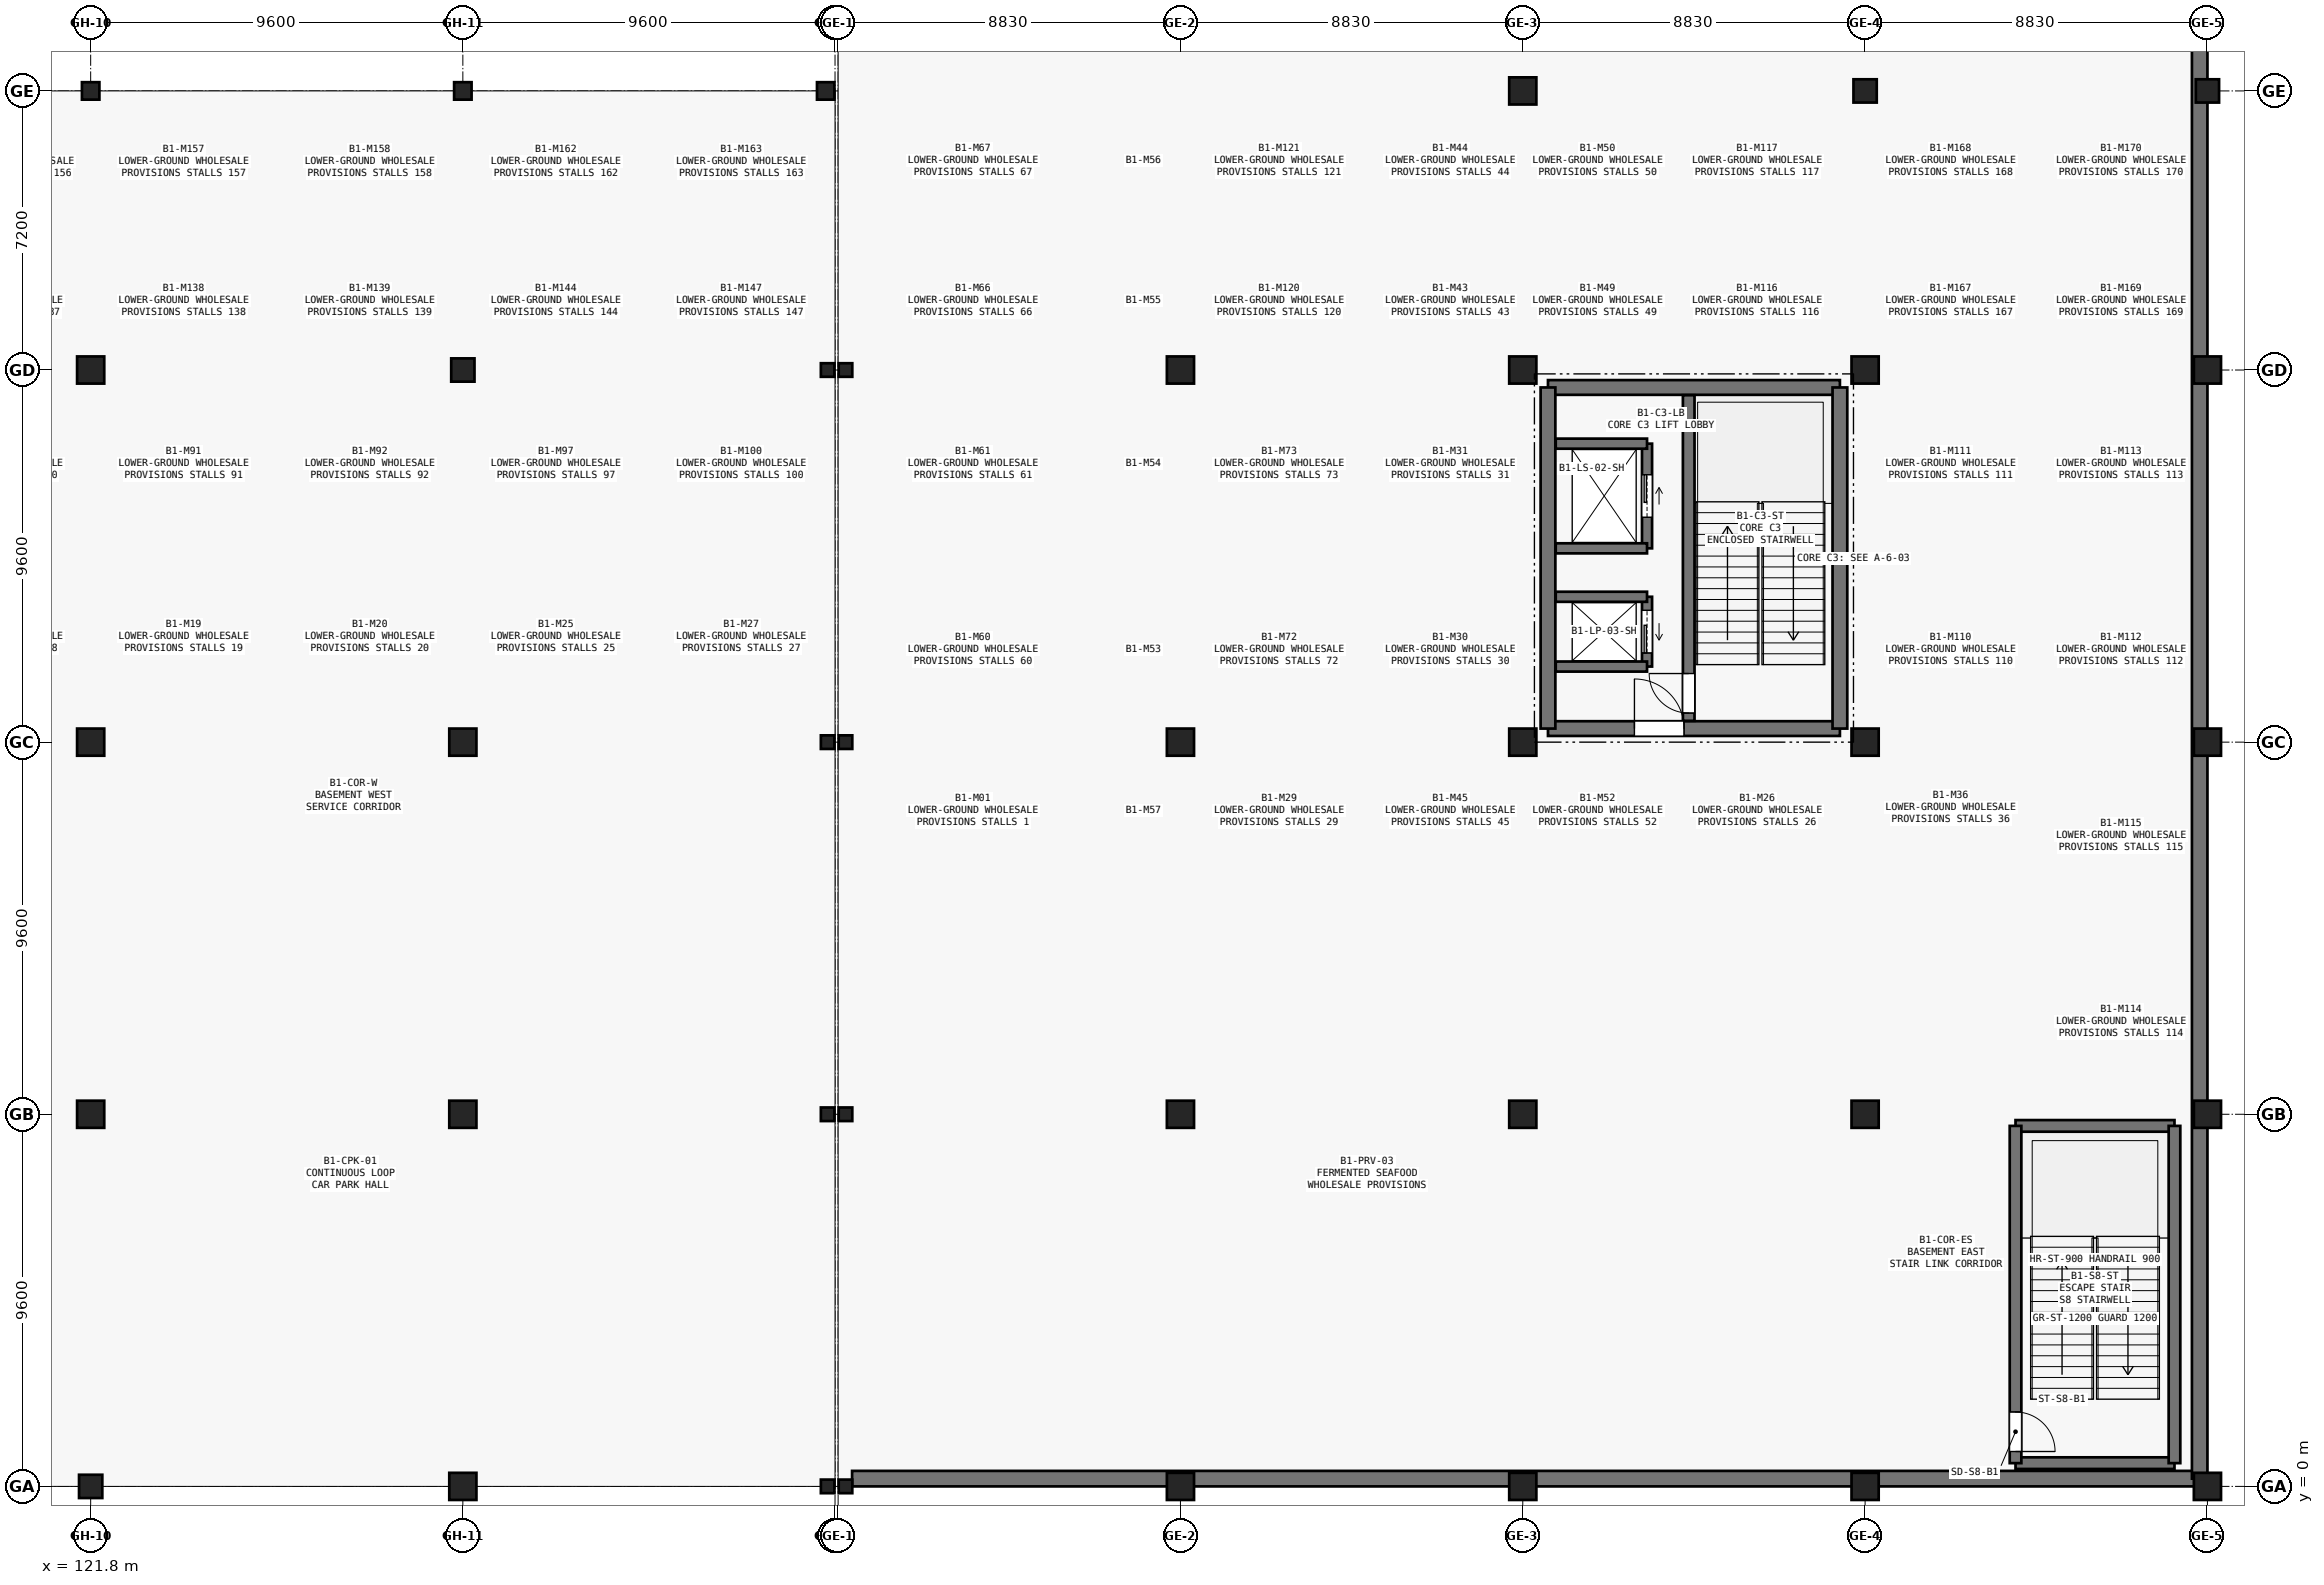
"""IFC4 building model, lengths in metres.
Left out: names, types, materials, properties, quantities, classifications, styles, units other than length and angle.
Written with IfcOpenShell. Run it as: python <this file> out.ifc"""

import sys

from ifc_helpers import new_model, si_unit, direction, frame, frame_2d, origin, origin_2d, place, context, subcontext, project, spatial, rectangle, circle, i_section, extrude, element, fill, save


model = new_model("IFC4")
c1 = context("Model", 3, precision=1e-05, world=origin(), true_north=direction((0.0, 1.0)))
c2 = subcontext(c1, "Body", "Model", "MODEL_VIEW")
j1 = project(units=[si_unit("LENGTHUNIT", "METRE"), si_unit("PLANEANGLEUNIT", "RADIAN")], contexts=[c1])
p1 = place(None, origin())
s1 = spatial("IfcSite", under=j1, at=p1, CompositionType="ELEMENT")
p2 = place(p1, origin())
s2 = spatial("IfcBuilding", under=s1, at=p2, CompositionType="ELEMENT")
p3 = place(p2, frame((0.0, 0.0, -5.4)))
s3 = spatial("IfcBuildingStorey", under=s2, at=p3, CompositionType="ELEMENT", Elevation=-5.4)
p4 = place(p3, frame((121.8, 0.0, 0.0), z_axis=(0.0, 0.0, 1.0), x_axis=(1.0, 0.0, 0.0)))
e1 = element("IfcColumn", 1, at=p4, inside=s3, PredefinedType="COLUMN", context=c2, shape_type="SweptSolid", body=[
    extrude(rectangle(XDim=0.6, YDim=0.6, at=origin_2d()), origin(), (0.0, 0.0, 1.0), 5.4),
])
for number, where, z_axis, x_axis in (
    (2, (121.8, 9.6, 0.0), (0.0, 0.0, 1.0), (1.0, 0.0, 0.0)),
    (3, (121.8, 19.2, 0.0), (0.0, 0.0, 1.0), (1.0, 0.0, 0.0)),
    (4, (121.8, 28.8, 0.0), (0.0, 0.0, 1.0), (1.0, 0.0, 0.0)),
):
    element("IfcColumn", number, at=place(p3, frame(where, z_axis=z_axis, x_axis=x_axis)), inside=s3, PredefinedType="COLUMN", context=c2, shape_type="SweptSolid", body=[
        extrude(circle(Radius=0.35, at=origin_2d()), origin(), (0.0, 0.0, 1.0), 5.4),
    ])
p5 = place(p3, frame((121.8, 36.0, 0.0), z_axis=(0.0, 0.0, 1.0), x_axis=(1.0, 0.0, 0.0)))
e5 = element("IfcColumn", 5, at=p5, inside=s3, PredefinedType="COLUMN", context=c2, shape_type="SweptSolid", body=[
    extrude(i_section(OverallWidth=0.45, OverallDepth=0.45, WebThickness=0.014, FlangeThickness=0.024, FilletRadius=0.024, at=origin_2d()), origin(), (0.0, 0.0, 1.0), 5.4),
])
for number, where, z_axis, x_axis in (
    (6, (131.4, 0.0, 0.0), (0.0, 0.0, 1.0), (1.0, 0.0, 0.0)),
    (7, (131.4, 9.6, 0.0), (0.0, 0.0, 1.0), (1.0, 0.0, 0.0)),
    (8, (131.4, 19.2, 0.0), (0.0, 0.0, 1.0), (1.0, 0.0, 0.0)),
):
    element("IfcColumn", number, at=place(p3, frame(where, z_axis=z_axis, x_axis=x_axis)), inside=s3, PredefinedType="COLUMN", context=c2, shape_type="SweptSolid", body=[
        extrude(circle(Radius=0.35, at=origin_2d()), origin(), (0.0, 0.0, 1.0), 5.4),
    ])
p6 = place(p3, frame((131.4, 28.8, 0.0), z_axis=(0.0, 0.0, 1.0), x_axis=(1.0, 0.0, 0.0)))
e9 = element("IfcColumn", 9, at=p6, inside=s3, PredefinedType="COLUMN", context=c2, shape_type="SweptSolid", body=[
    extrude(rectangle(XDim=0.6, YDim=0.6, at=origin_2d()), origin(), (0.0, 0.0, 1.0), 5.4),
])
p7 = place(p3, frame((131.4, 36.0, 0.0), z_axis=(0.0, 0.0, 1.0), x_axis=(1.0, 0.0, 0.0)))
e10 = element("IfcColumn", 10, at=p7, inside=s3, PredefinedType="COLUMN", context=c2, shape_type="SweptSolid", body=[
    extrude(i_section(OverallWidth=0.45, OverallDepth=0.45, WebThickness=0.014, FlangeThickness=0.024, FilletRadius=0.024, at=origin_2d()), origin(), (0.0, 0.0, 1.0), 5.4),
])
for number, where, z_axis, x_axis in (
    (11, (140.81, 0.0, 0.0), (0.0, 0.0, 1.0), (1.0, 0.0, 0.0)),
    (12, (140.81, 9.6, 0.0), (0.0, 0.0, 1.0), (1.0, 0.0, 0.0)),
    (13, (140.81, 19.2, 0.0), (0.0, 0.0, 1.0), (1.0, 0.0, 0.0)),
    (14, (140.81, 28.8, 0.0), (0.0, 0.0, 1.0), (1.0, 0.0, 0.0)),
):
    element("IfcColumn", number, at=place(p3, frame(where, z_axis=z_axis, x_axis=x_axis)), inside=s3, PredefinedType="COLUMN", context=c2, shape_type="SweptSolid", body=[
        extrude(i_section(OverallWidth=0.35, OverallDepth=0.35, WebThickness=0.012, FlangeThickness=0.019, FilletRadius=0.02, at=origin_2d()), origin(), (0.0, 0.0, 1.0), 5.4),
    ])
p8 = place(p3, frame((140.76, 36.0, 0.0), z_axis=(0.0, 0.0, 1.0), x_axis=(1.0, 0.0, 0.0)))
e15 = element("IfcColumn", 15, at=p8, inside=s3, PredefinedType="COLUMN", context=c2, shape_type="SweptSolid", body=[
    extrude(i_section(OverallWidth=0.45, OverallDepth=0.45, WebThickness=0.014, FlangeThickness=0.024, FilletRadius=0.024, at=origin_2d()), origin(), (0.0, 0.0, 1.0), 5.4),
])
for number, where, z_axis, x_axis in (
    (16, (141.27, 0.0, 0.0), (0.0, 0.0, 1.0), (1.0, 0.0, 0.0)),
    (17, (141.27, 9.6, 0.0), (0.0, 0.0, 1.0), (1.0, 0.0, 0.0)),
    (18, (141.27, 19.2, 0.0), (0.0, 0.0, 1.0), (1.0, 0.0, 0.0)),
    (19, (141.27, 28.8, 0.0), (0.0, 0.0, 1.0), (1.0, 0.0, 0.0)),
):
    element("IfcColumn", number, at=place(p3, frame(where, z_axis=z_axis, x_axis=x_axis)), inside=s3, PredefinedType="COLUMN", context=c2, shape_type="SweptSolid", body=[
        extrude(i_section(OverallWidth=0.35, OverallDepth=0.35, WebThickness=0.012, FlangeThickness=0.019, FilletRadius=0.02, at=origin_2d()), origin(), (0.0, 0.0, 1.0), 5.4),
    ])
for number, where, z_axis, x_axis in (
    (20, (149.91, 0.0, 0.0), (0.0, 0.0, 1.0), (1.0, 0.0, 0.0)),
    (21, (149.91, 9.6, 0.0), (0.0, 0.0, 1.0), (1.0, 0.0, 0.0)),
    (22, (149.91, 19.2, 0.0), (0.0, 0.0, 1.0), (1.0, 0.0, 0.0)),
    (23, (149.91, 28.8, 0.0), (0.0, 0.0, 1.0), (1.0, 0.0, 0.0)),
    (24, (158.74, 0.0, 0.0), (0.0, 0.0, 1.0), (1.0, 0.0, 0.0)),
    (25, (158.74, 9.6, 0.0), (0.0, 0.0, 1.0), (1.0, 0.0, 0.0)),
    (26, (158.74, 19.2, 0.0), (0.0, 0.0, 1.0), (1.0, 0.0, 0.0)),
    (27, (158.74, 28.8, 0.0), (0.0, 0.0, 1.0), (1.0, 0.0, 0.0)),
):
    element("IfcColumn", number, at=place(p3, frame(where, z_axis=z_axis, x_axis=x_axis)), inside=s3, PredefinedType="COLUMN", context=c2, shape_type="SweptSolid", body=[
        extrude(rectangle(XDim=0.7, YDim=0.7, at=origin_2d()), origin(), (0.0, 0.0, 1.0), 5.4),
    ])
p9 = place(p3, frame((158.74, 36.0, 0.0), z_axis=(0.0, 0.0, 1.0), x_axis=(1.0, 0.0, 0.0)))
e28 = element("IfcColumn", 28, at=p9, inside=s3, PredefinedType="COLUMN", context=c2, shape_type="SweptSolid", body=[
    extrude(circle(Radius=0.35, at=origin_2d()), origin(), (0.0, 0.0, 1.0), 5.4),
])
for number, where, z_axis, x_axis in (
    (29, (167.57, 0.0, 0.0), (0.0, 0.0, 1.0), (1.0, 0.0, 0.0)),
    (30, (167.57, 9.6, 0.0), (0.0, 0.0, 1.0), (1.0, 0.0, 0.0)),
    (31, (167.57, 19.2, 0.0), (0.0, 0.0, 1.0), (1.0, 0.0, 0.0)),
    (32, (167.57, 28.8, 0.0), (0.0, 0.0, 1.0), (1.0, 0.0, 0.0)),
):
    element("IfcColumn", number, at=place(p3, frame(where, z_axis=z_axis, x_axis=x_axis)), inside=s3, PredefinedType="COLUMN", context=c2, shape_type="SweptSolid", body=[
        extrude(rectangle(XDim=0.7, YDim=0.7, at=origin_2d()), origin(), (0.0, 0.0, 1.0), 5.4),
    ])
p10 = place(p3, frame((167.57, 36.0, 0.0), z_axis=(0.0, 0.0, 1.0), x_axis=(1.0, 0.0, 0.0)))
e33 = element("IfcColumn", 33, at=p10, inside=s3, PredefinedType="COLUMN", context=c2, shape_type="SweptSolid", body=[
    extrude(rectangle(XDim=0.6, YDim=0.6, at=origin_2d()), origin(), (0.0, 0.0, 1.0), 5.4),
])
for number, where, z_axis, x_axis in (
    (34, (176.4, 0.0, 0.0), (0.0, 0.0, 1.0), (1.0, 0.0, 0.0)),
    (35, (176.4, 9.6, 0.0), (0.0, 0.0, 1.0), (1.0, 0.0, 0.0)),
    (36, (176.4, 19.2, 0.0), (0.0, 0.0, 1.0), (1.0, 0.0, 0.0)),
    (37, (176.4, 28.8, 0.0), (0.0, 0.0, 1.0), (1.0, 0.0, 0.0)),
):
    element("IfcColumn", number, at=place(p3, frame(where, z_axis=z_axis, x_axis=x_axis)), inside=s3, PredefinedType="COLUMN", context=c2, shape_type="SweptSolid", body=[
        extrude(rectangle(XDim=0.7, YDim=0.7, at=origin_2d()), origin(), (0.0, 0.0, 1.0), 5.4),
    ])
p11 = place(p3, frame((176.4, 36.0, 0.0), z_axis=(0.0, 0.0, 1.0), x_axis=(1.0, 0.0, 0.0)))
e38 = element("IfcColumn", 38, at=p11, inside=s3, PredefinedType="COLUMN", context=c2, shape_type="SweptSolid", body=[
    extrude(rectangle(XDim=0.6, YDim=0.6, at=origin_2d()), origin(), (0.0, 0.0, 1.0), 5.4),
])
p12 = place(p3, frame((176.2, 0.2, 0.0), z_axis=(0.0, 0.0, 1.0), x_axis=(-1.0, 0.0, 0.0)))
e39 = element("IfcWall", 39, at=p12, inside=s3, PredefinedType="USERDEFINED", context=c2, shape_type="SweptSolid", body=[
    extrude(rectangle(XDim=34.76, YDim=0.4, at=frame_2d((17.38, 0.0))), origin(), (0.0, 0.0, 1.0), 4.85),
])
p13 = place(p3, frame((176.2, 61.8, 0.0), z_axis=(0.0, 0.0, 1.0), x_axis=(0.0, -1.0, 0.0)))
e40 = element("IfcWall", 40, at=p13, inside=s3, PredefinedType="USERDEFINED", context=c2, shape_type="SweptSolid", body=[
    extrude(rectangle(XDim=61.6, YDim=0.4, at=frame_2d((30.8, 0.0))), origin(), (0.0, 0.0, 1.0), 4.85),
])
p14 = place(p3, frame((159.39, 19.55, 0.0), z_axis=(0.0, 0.0, 1.0), x_axis=(1.0, 0.0, 0.0)))
e41 = element("IfcWall", 41, at=p14, inside=s3, PredefinedType="SHEAR", context=c2, shape_type="SweptSolid", body=[
    extrude(rectangle(XDim=7.53, YDim=0.38, at=frame_2d((3.765, 0.0))), origin(), (0.0, 0.0, 1.0), 5.4),
])
p15 = place(p14, frame((2.23, 0.0, 0.0)))
e42 = element("IfcOpeningElement", 42, at=p15, cuts=e41, PredefinedType="OPENING", context=c2, shape_type="SweptSolid", body=[
    extrude(rectangle(XDim=1.28, YDim=2.15, at=frame_2d((0.64, 1.075))), frame((0.0, 0.2, 0.0), z_axis=(0.0, -1.0, 0.0), x_axis=(1.0, 0.0, 0.0)), (0.0, 0.0, 1.0), 0.4),
])
p16 = place(p3, frame((166.92, 28.35, 0.0), z_axis=(0.0, 0.0, 1.0), x_axis=(-1.0, 0.0, 0.0)))
e43 = element("IfcWall", 43, at=p16, inside=s3, PredefinedType="SHEAR", context=c2, shape_type="SweptSolid", body=[
    extrude(rectangle(XDim=7.53, YDim=0.38, at=frame_2d((3.765, 0.0))), origin(), (0.0, 0.0, 1.0), 5.4),
])
for number, where, z_axis, x_axis in (
    (44, (159.39, 28.35, 0.0), (0.0, 0.0, 1.0), (0.0, -1.0, 0.0)),
    (45, (166.92, 19.55, 0.0), (0.0, 0.0, 1.0), (0.0, 1.0, 0.0)),
):
    element("IfcWall", number, at=place(p3, frame(where, z_axis=z_axis, x_axis=x_axis)), inside=s3, PredefinedType="SHEAR", context=c2, shape_type="SweptSolid", body=[
        extrude(rectangle(XDim=8.8, YDim=0.38, at=frame_2d((4.4, 0.0))), origin(), (0.0, 0.0, 1.0), 5.4),
    ])
p17 = place(p3, frame((163.02, 19.75, 0.0), z_axis=(0.0, 0.0, 1.0), x_axis=(0.0, 1.0, 0.0)))
e46 = element("IfcWall", 46, at=p17, inside=s3, PredefinedType="SHEAR", context=c2, shape_type="SweptSolid", body=[
    extrude(rectangle(XDim=8.4, YDim=0.3, at=frame_2d((4.2, 0.0))), origin(), (0.0, 0.0, 1.0), 5.4),
])
p18 = place(p17, frame((0.2, 0.0, 0.0)))
e47 = element("IfcOpeningElement", 47, at=p18, cuts=e46, PredefinedType="OPENING", context=c2, shape_type="SweptSolid", body=[
    extrude(rectangle(XDim=1.02, YDim=2.1, at=frame_2d((0.51, 1.05))), frame((0.0, 0.16, 0.0), z_axis=(0.0, -1.0, 0.0), x_axis=(1.0, 0.0, 0.0)), (0.0, 0.0, 1.0), 0.32),
])
p19 = place(p3, frame((161.945, 21.15, 0.0), z_axis=(0.0, 0.0, 1.0), x_axis=(0.0, 1.0, 0.0)))
e48 = element("IfcWall", 48, at=p19, inside=s3, PredefinedType="SHEAR", context=c2, shape_type="SweptSolid", body=[
    extrude(rectangle(XDim=1.8, YDim=0.26, at=frame_2d((0.9, 0.0))), origin(), (0.0, 0.0, 1.0), 5.4),
])
p20 = place(p19, frame((0.35, 0.0, 0.0)))
e49 = element("IfcOpeningElement", 49, at=p20, cuts=e48, PredefinedType="OPENING", context=c2, shape_type="SweptSolid", body=[
    extrude(rectangle(XDim=1.1, YDim=2.15, at=frame_2d((0.55, 1.075))), frame((0.0, 0.14, 0.0), z_axis=(0.0, -1.0, 0.0), x_axis=(1.0, 0.0, 0.0)), (0.0, 0.0, 1.0), 0.28),
])
for number, where, z_axis, x_axis in (
    (50, (159.59, 21.15, 0.0), (0.0, 0.0, 1.0), (1.0, 0.0, 0.0)),
    (51, (159.59, 22.95, 0.0), (0.0, 0.0, 1.0), (1.0, 0.0, 0.0)),
):
    element("IfcWall", number, at=place(p3, frame(where, z_axis=z_axis, x_axis=x_axis)), inside=s3, PredefinedType="SHEAR", context=c2, shape_type="SweptSolid", body=[
        extrude(rectangle(XDim=2.355, YDim=0.26, at=frame_2d((1.177, 0.0))), origin(), (0.0, 0.0, 1.0), 5.4),
    ])
p21 = place(p3, frame((161.945, 24.2, 0.0), z_axis=(0.0, 0.0, 1.0), x_axis=(0.0, 1.0, 0.0)))
e52 = element("IfcWall", 52, at=p21, inside=s3, PredefinedType="SHEAR", context=c2, shape_type="SweptSolid", body=[
    extrude(rectangle(XDim=2.7, YDim=0.26, at=frame_2d((1.35, 0.0))), origin(), (0.0, 0.0, 1.0), 5.4),
])
p22 = place(p21, frame((0.8, 0.0, 0.0)))
e53 = element("IfcOpeningElement", 53, at=p22, cuts=e52, PredefinedType="OPENING", context=c2, shape_type="SweptSolid", body=[
    extrude(rectangle(XDim=1.1, YDim=2.15, at=frame_2d((0.55, 1.075))), frame((0.0, 0.14, 0.0), z_axis=(0.0, -1.0, 0.0), x_axis=(1.0, 0.0, 0.0)), (0.0, 0.0, 1.0), 0.28),
])
for number, where, z_axis, x_axis in (
    (54, (159.59, 24.2, 0.0), (0.0, 0.0, 1.0), (1.0, 0.0, 0.0)),
    (55, (159.59, 26.9, 0.0), (0.0, 0.0, 1.0), (1.0, 0.0, 0.0)),
):
    element("IfcWall", number, at=place(p3, frame(where, z_axis=z_axis, x_axis=x_axis)), inside=s3, PredefinedType="SHEAR", context=c2, shape_type="SweptSolid", body=[
        extrude(rectangle(XDim=2.355, YDim=0.26, at=frame_2d((1.177, 0.0))), origin(), (0.0, 0.0, 1.0), 5.4),
    ])
for number, where, z_axis, x_axis in (
    (56, (171.45, 0.6, 0.0), (0.0, 0.0, 1.0), (1.0, 0.0, 0.0)),
    (57, (175.55, 9.3, 0.0), (0.0, 0.0, 1.0), (-1.0, 0.0, 0.0)),
):
    element("IfcWall", number, at=place(p3, frame(where, z_axis=z_axis, x_axis=x_axis)), inside=s3, PredefinedType="SHEAR", context=c2, shape_type="SweptSolid", body=[
        extrude(rectangle(XDim=4.1, YDim=0.3, at=frame_2d((2.05, 0.0))), origin(), (0.0, 0.0, 1.0), 5.4),
    ])
p23 = place(p3, frame((171.45, 9.3, 0.0), z_axis=(0.0, 0.0, 1.0), x_axis=(0.0, -1.0, 0.0)))
e58 = element("IfcWall", 58, at=p23, inside=s3, PredefinedType="SHEAR", context=c2, shape_type="SweptSolid", body=[
    extrude(rectangle(XDim=8.7, YDim=0.3, at=frame_2d((4.35, 0.0))), origin(), (0.0, 0.0, 1.0), 5.4),
])
p24 = place(p23, frame((7.38, 0.0, 0.0)))
e59 = element("IfcOpeningElement", 59, at=p24, cuts=e58, PredefinedType="OPENING", context=c2, shape_type="SweptSolid", body=[
    extrude(rectangle(XDim=1.02, YDim=2.1, at=frame_2d((0.51, 1.05))), frame((0.0, 0.16, 0.0), z_axis=(0.0, -1.0, 0.0), x_axis=(1.0, 0.0, 0.0)), (0.0, 0.0, 1.0), 0.32),
])
p25 = place(p3, frame((175.55, 0.6, 0.0), z_axis=(0.0, 0.0, 1.0), x_axis=(0.0, 1.0, 0.0)))
e60 = element("IfcWall", 60, at=p25, inside=s3, PredefinedType="SHEAR", context=c2, shape_type="SweptSolid", body=[
    extrude(rectangle(XDim=8.7, YDim=0.3, at=frame_2d((4.35, 0.0))), origin(), (0.0, 0.0, 1.0), 5.4),
])
p26 = place(p15, origin())
e61 = element("IfcDoor", 61, at=p26, inside=s3, OperationType="SINGLE_SWING_LEFT", PredefinedType="DOOR", context=c2, shape_type="SweptSolid", body=[
    extrude(rectangle(XDim=1.28, YDim=2.15, at=frame_2d((0.64, 1.075))), frame((0.0, 0.025, 0.0), z_axis=(0.0, -1.0, 0.0), x_axis=(1.0, 0.0, 0.0)), (0.0, 0.0, 1.0), 0.05),
])
fill(e42, e61)
p27 = place(p18, origin())
e62 = element("IfcDoor", 62, at=p27, inside=s3, OperationType="SINGLE_SWING_RIGHT", PredefinedType="DOOR", context=c2, shape_type="SweptSolid", body=[
    extrude(rectangle(XDim=1.02, YDim=2.1, at=frame_2d((0.51, 1.05))), frame((0.0, 0.025, 0.0), z_axis=(0.0, -1.0, 0.0), x_axis=(1.0, 0.0, 0.0)), (0.0, 0.0, 1.0), 0.05),
])
fill(e47, e62)
p28 = place(p20, origin())
e63 = element("IfcDoor", 63, at=p28, inside=s3, OperationType="SLIDING_TO_LEFT", PredefinedType="DOOR", context=c2, shape_type="SweptSolid", body=[
    extrude(rectangle(XDim=1.1, YDim=2.15, at=frame_2d((0.55, 1.075))), frame((0.0, 0.025, 0.0), z_axis=(0.0, -1.0, 0.0), x_axis=(1.0, 0.0, 0.0)), (0.0, 0.0, 1.0), 0.05),
])
fill(e49, e63)
p29 = place(p22, origin())
e64 = element("IfcDoor", 64, at=p29, inside=s3, OperationType="SLIDING_TO_RIGHT", PredefinedType="DOOR", context=c2, shape_type="SweptSolid", body=[
    extrude(rectangle(XDim=1.1, YDim=2.15, at=frame_2d((0.55, 1.075))), frame((0.0, 0.025, 0.0), z_axis=(0.0, -1.0, 0.0), x_axis=(1.0, 0.0, 0.0)), (0.0, 0.0, 1.0), 0.05),
])
fill(e53, e64)
p30 = place(p24, origin())
e65 = element("IfcDoor", 65, at=p30, inside=s3, OperationType="SINGLE_SWING_RIGHT", PredefinedType="DOOR", context=c2, shape_type="SweptSolid", body=[
    extrude(rectangle(XDim=1.02, YDim=2.1, at=frame_2d((0.51, 1.05))), frame((0.0, 0.025, 0.0), z_axis=(0.0, -1.0, 0.0), x_axis=(1.0, 0.0, 0.0)), (0.0, 0.0, 1.0), 0.05),
])
fill(e59, e65)
save(model, sys.argv[1])
